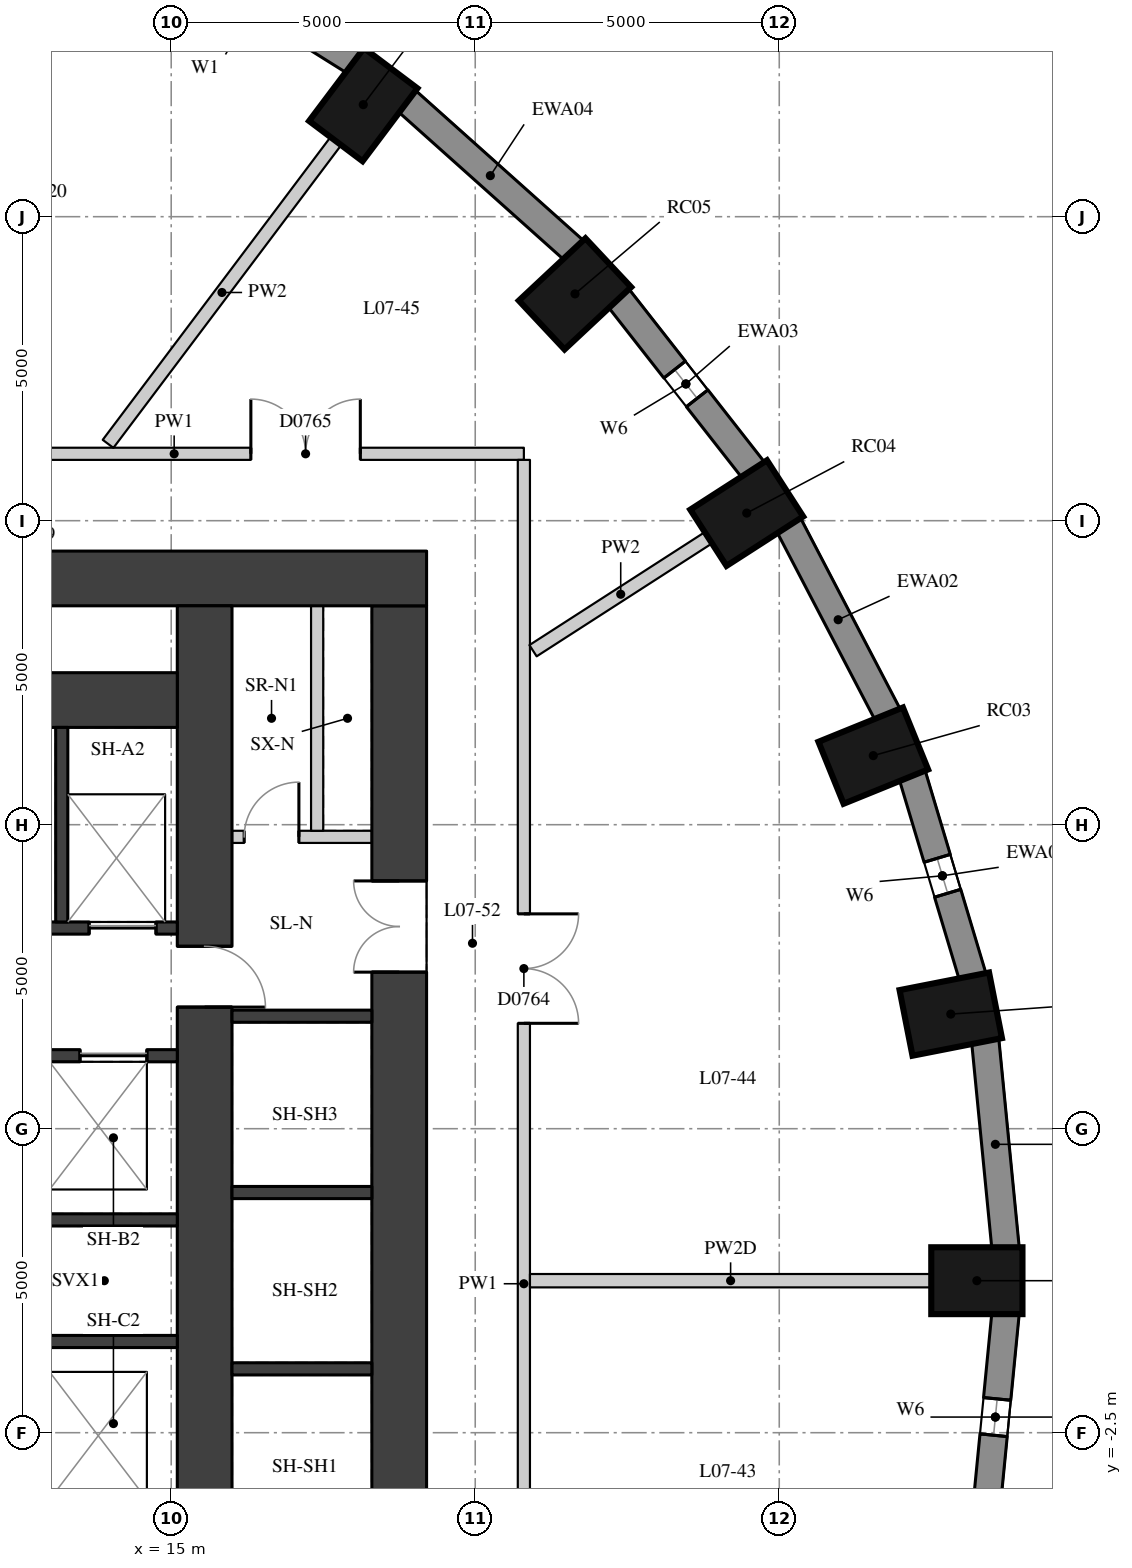
"""IFC4 building model, lengths in metres.
Left out: names, types, materials, properties, quantities, classifications, styles, units other than length and angle.
Written with IfcOpenShell. Run it as: python <this file> out.ifc"""

import sys

from ifc_helpers import new_model, si_unit, direction, frame, frame_2d, origin, origin_2d, place, context, subcontext, project, spatial, rectangle, extrude, element, fill, save


model = new_model("IFC4")
c1 = context("Model", 3, precision=1e-05, world=origin(), true_north=direction((0.0, 1.0)))
c2 = subcontext(c1, "Body", "Model", "MODEL_VIEW")
j1 = project(units=[si_unit("LENGTHUNIT", "METRE"), si_unit("PLANEANGLEUNIT", "RADIAN")], contexts=[c1])
p1 = place(None, origin())
s1 = spatial("IfcSite", under=j1, at=p1, CompositionType="ELEMENT")
p2 = place(p1, origin())
s2 = spatial("IfcBuilding", under=s1, at=p2, CompositionType="ELEMENT")
p3 = place(p2, frame((0.0, 0.0, 31.6)))
s3 = spatial("IfcBuildingStorey", under=s2, at=p3, CompositionType="ELEMENT", Elevation=31.6)
for number, where, z_axis, x_axis in (
    (1, (28.25, 0.0, 0.0), (0.0, 0.0, 1.0), (1.0, 0.0, 0.0)),
    (2, (27.821, 4.385, 0.0), (0.0, 0.0, 1.0), (0.981, 0.193, 0.0)),
    (3, (26.546, 8.636, 0.0), (0.0, 0.0, 1.0), (0.927, 0.376, 0.0)),
    (4, (24.465, 12.625, 0.0), (0.0, 0.0, 1.0), (0.841, 0.541, 0.0)),
    (5, (21.641, 16.23, 0.0), (0.0, 0.0, 1.0), (0.73, 0.683, 0.0)),
    (6, (18.159, 19.343, 0.0), (0.0, 0.0, 1.0), (0.601, 0.799, 0.0)),
):
    element("IfcColumn", number, at=place(p3, frame(where, z_axis=z_axis, x_axis=x_axis)), inside=s3, PredefinedType="COLUMN", context=c2, shape_type="SweptSolid", body=[
        extrude(rectangle(XDim=1.5, YDim=1.1, at=origin_2d()), origin(), (0.0, 0.0, 1.0), 3.3),
    ])
p4 = place(p3, frame((28.722, 0.53, 0.0), z_axis=(0.0, 0.0, 1.0), x_axis=(-0.097389581596, 0.995246336038, 0.0)))
e7 = element("IfcWall", 7, at=p4, inside=s3, PredefinedType="SOLIDWALL", context=c2, shape_type="SweptSolid", body=[
    extrude(rectangle(XDim=3.442, YDim=0.45, at=frame_2d((1.721, 0.0))), origin(), (0.0, 0.0, 1.0), 3.02),
])
p5 = place(p3, frame((28.182, 4.996, 0.0), z_axis=(0.0, 0.0, 1.0), x_axis=(-0.287064133733, 0.957911364963, 0.0)))
e8 = element("IfcWall", 8, at=p5, inside=s3, PredefinedType="SOLIDWALL", context=c2, shape_type="SweptSolid", body=[
    extrude(rectangle(XDim=3.473, YDim=0.45, at=frame_2d((1.737, 0.0))), origin(), (0.0, 0.0, 1.0), 3.02),
])
p6 = place(p5, frame((1.437, 0.0, 0.4)))
e9 = element("IfcOpeningElement", 9, at=p6, cuts=e8, PredefinedType="OPENING", context=c2, shape_type="SweptSolid", body=[
    extrude(rectangle(XDim=0.6, YDim=1.75, at=frame_2d((0.3, 0.875))), frame((0.0, 0.235, 0.0), z_axis=(0.0, -1.0, 0.0), x_axis=(1.0, 0.0, 0.0)), (0.0, 0.0, 1.0), 0.47),
])
p7 = place(p3, frame((26.786, 9.305, 0.0), z_axis=(0.0, 0.0, 1.0), x_axis=(-0.462492775226, 0.886623050041, 0.0)))
e10 = element("IfcWall", 10, at=p7, inside=s3, PredefinedType="SOLIDWALL", context=c2, shape_type="SweptSolid", body=[
    extrude(rectangle(XDim=3.532, YDim=0.45, at=frame_2d((1.766, 0.0))), origin(), (0.0, 0.0, 1.0), 3.02),
])
p8 = place(p3, frame((24.578, 13.328, 0.0), z_axis=(0.0, 0.0, 1.0), x_axis=(-0.616661975264, 0.787228053529, 0.0)))
e11 = element("IfcWall", 11, at=p8, inside=s3, PredefinedType="SOLIDWALL", context=c2, shape_type="SweptSolid", body=[
    extrude(rectangle(XDim=3.61, YDim=0.45, at=frame_2d((1.805, 0.0))), origin(), (0.0, 0.0, 1.0), 3.02),
])
p9 = place(p8, frame((1.505, 0.0, 0.4)))
e12 = element("IfcOpeningElement", 12, at=p9, cuts=e11, PredefinedType="OPENING", context=c2, shape_type="SweptSolid", body=[
    extrude(rectangle(XDim=0.6, YDim=1.75, at=frame_2d((0.3, 0.875))), frame((0.0, 0.235, 0.0), z_axis=(0.0, -1.0, 0.0), x_axis=(1.0, 0.0, 0.0)), (0.0, 0.0, 1.0), 0.47),
])
p10 = place(p3, frame((21.627, 16.943, 0.0), z_axis=(0.0, 0.0, 1.0), x_axis=(-0.745526233716, 0.66647628228, 0.0)))
e13 = element("IfcWall", 13, at=p10, inside=s3, PredefinedType="SOLIDWALL", context=c2, shape_type="SweptSolid", body=[
    extrude(rectangle(XDim=3.697, YDim=0.45, at=frame_2d((1.848, 0.0))), origin(), (0.0, 0.0, 1.0), 3.02),
])
p11 = place(p3, frame((18.023, 20.044, 0.0), z_axis=(0.0, 0.0, 1.0), x_axis=(-0.847635480093, 0.530579016629, 0.0)))
e14 = element("IfcWall", 14, at=p11, inside=s3, PredefinedType="SOLIDWALL", context=c2, shape_type="SweptSolid", body=[
    extrude(rectangle(XDim=3.782, YDim=0.45, at=frame_2d((1.891, 0.0))), origin(), (0.0, 0.0, 1.0), 3.02),
])
p12 = place(p11, frame((0.791, 0.0, 0.4)))
e15 = element("IfcOpeningElement", 15, at=p12, cuts=e14, PredefinedType="OPENING", context=c2, shape_type="SweptSolid", body=[
    extrude(rectangle(XDim=2.2, YDim=1.75, at=frame_2d((1.1, 0.875))), frame((0.0, 0.235, 0.0), z_axis=(0.0, -1.0, 0.0), x_axis=(1.0, 0.0, 0.0)), (0.0, 0.0, 1.0), 0.47),
])
p13 = place(p3, frame((28.387, -3.956, 0.0), z_axis=(0.0, 0.0, 1.0), x_axis=(0.097389581596, 0.995246336038, 0.0)))
e16 = element("IfcWall", 16, at=p13, inside=s3, PredefinedType="SOLIDWALL", context=c2, shape_type="SweptSolid", body=[
    extrude(rectangle(XDim=3.442, YDim=0.45, at=frame_2d((1.721, 0.0))), origin(), (0.0, 0.0, 1.0), 3.02),
])
p14 = place(p13, frame((1.421, 0.0, 0.4)))
e17 = element("IfcOpeningElement", 17, at=p14, cuts=e16, PredefinedType="OPENING", context=c2, shape_type="SweptSolid", body=[
    extrude(rectangle(XDim=0.6, YDim=1.75, at=frame_2d((0.3, 0.875))), frame((0.0, 0.235, 0.0), z_axis=(0.0, -1.0, 0.0), x_axis=(1.0, 0.0, 0.0)), (0.0, 0.0, 1.0), 0.47),
])
p15 = place(p3, frame((18.75, -11.1, 0.0), z_axis=(0.0, 0.0, 1.0), x_axis=(0.0, 1.0, 0.0)))
e18 = element("IfcWall", 18, at=p15, inside=s3, PredefinedType="SHEAR", context=c2, shape_type="SweptSolid", body=[
    extrude(rectangle(XDim=22.2, YDim=0.9, at=frame_2d((11.1, 0.0))), origin(), (0.0, 0.0, 1.0), 3.02),
])
p16 = place(p15, frame((16.175, 0.0, 0.0)))
e19 = element("IfcOpeningElement", 19, at=p16, cuts=e18, PredefinedType="OPENING", context=c2, shape_type="SweptSolid", body=[
    extrude(rectangle(XDim=1.5, YDim=2.1, at=frame_2d((0.75, 1.05))), frame((0.0, 0.46, 0.0), z_axis=(0.0, -1.0, 0.0), x_axis=(1.0, 0.0, 0.0)), (0.0, 0.0, 1.0), 0.92),
])
p17 = place(p15, frame((5.025, 0.0, 0.0)))
e20 = element("IfcOpeningElement", 20, at=p17, cuts=e18, PredefinedType="OPENING", context=c2, shape_type="SweptSolid", body=[
    extrude(rectangle(XDim=1.5, YDim=2.1, at=frame_2d((0.75, 1.05))), frame((0.0, 0.46, 0.0), z_axis=(0.0, -1.0, 0.0), x_axis=(1.0, 0.0, 0.0)), (0.0, 0.0, 1.0), 0.92),
])
p18 = place(p3, frame((4.0, 11.55, 0.0), z_axis=(0.0, 0.0, 1.0), x_axis=(1.0, 0.0, 0.0)))
e21 = element("IfcWall", 21, at=p18, inside=s3, PredefinedType="SHEAR", context=c2, shape_type="SweptSolid", body=[
    extrude(rectangle(XDim=15.2, YDim=0.9, at=frame_2d((7.6, 0.0))), origin(), (0.0, 0.0, 1.0), 3.02),
])
p19 = place(p3, frame((15.55, -11.1, 0.0), z_axis=(0.0, 0.0, 1.0), x_axis=(0.0, 1.0, 0.0)))
e22 = element("IfcWall", 22, at=p19, inside=s3, PredefinedType="SHEAR", context=c2, shape_type="SweptSolid", body=[
    extrude(rectangle(XDim=22.2, YDim=0.9, at=frame_2d((11.1, 0.0))), origin(), (0.0, 0.0, 1.0), 3.02),
])
p20 = place(p19, frame((15.6, 0.0, 0.0)))
e23 = element("IfcOpeningElement", 23, at=p20, cuts=e22, PredefinedType="OPENING", context=c2, shape_type="SweptSolid", body=[
    extrude(rectangle(XDim=1.0, YDim=2.1, at=frame_2d((0.5, 1.05))), frame((0.0, 0.46, 0.0), z_axis=(0.0, -1.0, 0.0), x_axis=(1.0, 0.0, 0.0)), (0.0, 0.0, 1.0), 0.92),
])
p21 = place(p19, frame((5.6, 0.0, 0.0)))
e24 = element("IfcOpeningElement", 24, at=p21, cuts=e22, PredefinedType="OPENING", context=c2, shape_type="SweptSolid", body=[
    extrude(rectangle(XDim=1.0, YDim=2.1, at=frame_2d((0.5, 1.05))), frame((0.0, 0.46, 0.0), z_axis=(0.0, -1.0, 0.0), x_axis=(1.0, 0.0, 0.0)), (0.0, 0.0, 1.0), 0.92),
])
p22 = place(p3, frame((4.9, 9.55, 0.0), z_axis=(0.0, 0.0, 1.0), x_axis=(1.0, 0.0, 0.0)))
e25 = element("IfcWall", 25, at=p22, inside=s3, PredefinedType="SHEAR", context=c2, shape_type="SweptSolid", body=[
    extrude(rectangle(XDim=10.2, YDim=0.9, at=frame_2d((5.1, 0.0))), origin(), (0.0, 0.0, 1.0), 3.02),
])
p23 = place(p3, frame((4.9, 5.8, 0.0), z_axis=(0.0, 0.0, 1.0), x_axis=(1.0, 0.0, 0.0)))
e26 = element("IfcWall", 26, at=p23, inside=s3, PredefinedType="SHEAR", context=c2, shape_type="SweptSolid", body=[
    extrude(rectangle(XDim=10.2, YDim=0.2, at=frame_2d((5.1, 0.0))), origin(), (0.0, 0.0, 1.0), 3.02),
])
p24 = place(p23, frame((6.75, 0.0, 0.0)))
e27 = element("IfcOpeningElement", 27, at=p24, cuts=e26, PredefinedType="OPENING", context=c2, shape_type="SweptSolid", body=[
    extrude(rectangle(XDim=1.1, YDim=2.1, at=frame_2d((0.55, 1.05))), frame((0.0, 0.11, 0.0), z_axis=(0.0, -1.0, 0.0), x_axis=(1.0, 0.0, 0.0)), (0.0, 0.0, 1.0), 0.22),
])
p25 = place(p23, frame((8.75, 0.0, 0.0)))
e28 = element("IfcOpeningElement", 28, at=p25, cuts=e26, PredefinedType="OPENING", context=c2, shape_type="SweptSolid", body=[
    extrude(rectangle(XDim=1.1, YDim=2.1, at=frame_2d((0.55, 1.05))), frame((0.0, 0.11, 0.0), z_axis=(0.0, -1.0, 0.0), x_axis=(1.0, 0.0, 0.0)), (0.0, 0.0, 1.0), 0.22),
])
p26 = place(p3, frame((4.9, 3.7, 0.0), z_axis=(0.0, 0.0, 1.0), x_axis=(1.0, 0.0, 0.0)))
e29 = element("IfcWall", 29, at=p26, inside=s3, PredefinedType="SHEAR", context=c2, shape_type="SweptSolid", body=[
    extrude(rectangle(XDim=10.2, YDim=0.2, at=frame_2d((5.1, 0.0))), origin(), (0.0, 0.0, 1.0), 3.02),
])
p27 = place(p26, frame((6.3, 0.0, 0.0)))
e30 = element("IfcOpeningElement", 30, at=p27, cuts=e29, PredefinedType="OPENING", context=c2, shape_type="SweptSolid", body=[
    extrude(rectangle(XDim=1.1, YDim=2.1, at=frame_2d((0.55, 1.05))), frame((0.0, 0.11, 0.0), z_axis=(0.0, -1.0, 0.0), x_axis=(1.0, 0.0, 0.0)), (0.0, 0.0, 1.0), 0.22),
])
p28 = place(p26, frame((8.6, 0.0, 0.0)))
e31 = element("IfcOpeningElement", 31, at=p28, cuts=e29, PredefinedType="OPENING", context=c2, shape_type="SweptSolid", body=[
    extrude(rectangle(XDim=1.1, YDim=2.1, at=frame_2d((0.55, 1.05))), frame((0.0, 0.11, 0.0), z_axis=(0.0, -1.0, 0.0), x_axis=(1.0, 0.0, 0.0)), (0.0, 0.0, 1.0), 0.22),
])
for number, where, z_axis, x_axis in (
    (32, (4.9, 1.0, 0.0), (0.0, 0.0, 1.0), (1.0, 0.0, 0.0)),
    (33, (4.9, -1.0, 0.0), (0.0, 0.0, 1.0), (1.0, 0.0, 0.0)),
):
    element("IfcWall", number, at=place(p3, frame(where, z_axis=z_axis, x_axis=x_axis)), inside=s3, PredefinedType="SHEAR", context=c2, shape_type="SweptSolid", body=[
        extrude(rectangle(XDim=10.2, YDim=0.2, at=frame_2d((5.1, 0.0))), origin(), (0.0, 0.0, 1.0), 3.02),
    ])
p29 = place(p3, frame((13.2, 5.9, 0.0), z_axis=(0.0, 0.0, 1.0), x_axis=(0.0, 1.0, 0.0)))
e34 = element("IfcWall", 34, at=p29, inside=s3, PredefinedType="SHEAR", context=c2, shape_type="SweptSolid", body=[
    extrude(rectangle(XDim=3.2, YDim=0.2, at=frame_2d((1.6, 0.0))), origin(), (0.0, 0.0, 1.0), 3.02),
])
for number, where, z_axis, x_axis in (
    (35, (16.0, -1.45, 0.0), (0.0, 0.0, 1.0), (1.0, 0.0, 0.0)),
    (36, (16.0, 1.45, 0.0), (0.0, 0.0, 1.0), (1.0, 0.0, 0.0)),
    (37, (16.0, 4.35, 0.0), (0.0, 0.0, 1.0), (1.0, 0.0, 0.0)),
):
    element("IfcWall", number, at=place(p3, frame(where, z_axis=z_axis, x_axis=x_axis)), inside=s3, PredefinedType="SHEAR", context=c2, shape_type="SweptSolid", body=[
        extrude(rectangle(XDim=2.3, YDim=0.2, at=frame_2d((1.15, 0.0))), origin(), (0.0, 0.0, 1.0), 3.02),
    ])
p30 = place(p3, frame((16.0, 7.3, 0.0), z_axis=(0.0, 0.0, 1.0), x_axis=(1.0, 0.0, 0.0)))
e38 = element("IfcWall", 38, at=p30, inside=s3, PredefinedType="PARTITIONING", context=c2, shape_type="SweptSolid", body=[
    extrude(rectangle(XDim=2.3, YDim=0.2, at=frame_2d((1.15, 0.0))), origin(), (0.0, 0.0, 1.0), 3.02),
])
p31 = place(p30, frame((0.2, 0.0, 0.0)))
e39 = element("IfcOpeningElement", 39, at=p31, cuts=e38, PredefinedType="OPENING", context=c2, shape_type="SweptSolid", body=[
    extrude(rectangle(XDim=0.9, YDim=2.1, at=frame_2d((0.45, 1.05))), frame((0.0, 0.11, 0.0), z_axis=(0.0, -1.0, 0.0), x_axis=(1.0, 0.0, 0.0)), (0.0, 0.0, 1.0), 0.22),
])
p32 = place(p3, frame((17.4, 7.4, 0.0), z_axis=(0.0, 0.0, 1.0), x_axis=(0.0, 1.0, 0.0)))
e40 = element("IfcWall", 40, at=p32, inside=s3, PredefinedType="PARTITIONING", context=c2, shape_type="SweptSolid", body=[
    extrude(rectangle(XDim=3.7, YDim=0.2, at=frame_2d((1.85, 0.0))), origin(), (0.0, 0.0, 1.0), 3.02),
])
p33 = place(p3, frame((9.297, 13.6, 0.0), z_axis=(0.0, 0.0, 1.0), x_axis=(1.0, 0.0, 0.0)))
e41 = element("IfcWall", 41, at=p33, inside=s3, PredefinedType="PARTITIONING", context=c2, shape_type="SweptSolid", body=[
    extrude(rectangle(XDim=11.503, YDim=0.2, at=frame_2d((5.751, 0.0))), origin(), (0.0, 0.0, 1.0), 3.02),
])
p34 = place(p33, frame((0.22, 0.0, 0.0)))
e42 = element("IfcOpeningElement", 42, at=p34, cuts=e41, PredefinedType="OPENING", context=c2, shape_type="SweptSolid", body=[
    extrude(rectangle(XDim=1.1, YDim=2.1, at=frame_2d((0.55, 1.05))), frame((0.0, 0.11, 0.0), z_axis=(0.0, -1.0, 0.0), x_axis=(1.0, 0.0, 0.0)), (0.0, 0.0, 1.0), 0.22),
])
p35 = place(p33, frame((7.013, 0.0, 0.0)))
e43 = element("IfcOpeningElement", 43, at=p35, cuts=e41, PredefinedType="OPENING", context=c2, shape_type="SweptSolid", body=[
    extrude(rectangle(XDim=1.8, YDim=2.1, at=frame_2d((0.9, 1.05))), frame((0.0, 0.11, 0.0), z_axis=(0.0, -1.0, 0.0), x_axis=(1.0, 0.0, 0.0)), (0.0, 0.0, 1.0), 0.22),
])
p36 = place(p3, frame((20.8, 13.5, 0.0), z_axis=(0.0, 0.0, 1.0), x_axis=(0.0, -1.0, 0.0)))
e44 = element("IfcWall", 44, at=p36, inside=s3, PredefinedType="PARTITIONING", context=c2, shape_type="SweptSolid", body=[
    extrude(rectangle(XDim=27.1, YDim=0.2, at=frame_2d((13.55, 0.0))), origin(), (0.0, 0.0, 1.0), 3.02),
])
p37 = place(p36, frame((17.733, 0.0, 0.0)))
e45 = element("IfcOpeningElement", 45, at=p37, cuts=e44, PredefinedType="OPENING", context=c2, shape_type="SweptSolid", body=[
    extrude(rectangle(XDim=1.8, YDim=2.1, at=frame_2d((0.9, 1.05))), frame((0.0, 0.11, 0.0), z_axis=(0.0, -1.0, 0.0), x_axis=(1.0, 0.0, 0.0)), (0.0, 0.0, 1.0), 0.22),
])
p38 = place(p36, frame((7.467, 0.0, 0.0)))
e46 = element("IfcOpeningElement", 46, at=p38, cuts=e44, PredefinedType="OPENING", context=c2, shape_type="SweptSolid", body=[
    extrude(rectangle(XDim=1.8, YDim=2.1, at=frame_2d((0.9, 1.05))), frame((0.0, 0.11, 0.0), z_axis=(0.0, -1.0, 0.0), x_axis=(1.0, 0.0, 0.0)), (0.0, 0.0, 1.0), 0.22),
])
p39 = place(p3, frame((27.5, 0.0, 0.0), z_axis=(0.0, 0.0, 1.0), x_axis=(-1.0, 0.0, 0.0)))
e47 = element("IfcWall", 47, at=p39, inside=s3, PredefinedType="PARTITIONING", context=c2, shape_type="SweptSolid", body=[
    extrude(rectangle(XDim=6.6, YDim=0.22, at=frame_2d((3.3, 0.0))), origin(), (0.0, 0.0, 1.0), 2.47),
])
p40 = place(p3, frame((23.835, 12.219, 0.0), z_axis=(0.0, 0.0, 1.0), x_axis=(-0.840694872373, -0.541509124176, 0.0)))
e48 = element("IfcWall", 48, at=p40, inside=s3, PredefinedType="PARTITIONING", context=c2, shape_type="SweptSolid", body=[
    extrude(rectangle(XDim=3.43, YDim=0.22, at=frame_2d((1.715, 0.0))), origin(), (0.0, 0.0, 1.0), 3.02),
])
p41 = place(p3, frame((17.708, 18.743, 0.0), z_axis=(0.0, 0.0, 1.0), x_axis=(-0.601177883261, -0.799115231164, 0.0)))
e49 = element("IfcWall", 49, at=p41, inside=s3, PredefinedType="PARTITIONING", context=c2, shape_type="SweptSolid", body=[
    extrude(rectangle(XDim=6.231, YDim=0.22, at=frame_2d((3.116, 0.0))), origin(), (0.0, 0.0, 1.0), 3.02),
])
p42 = place(p6, origin())
e50 = element("IfcWindow", 50, at=p42, inside=s3, PartitioningType="SINGLE_PANEL", PredefinedType="WINDOW", context=c2, shape_type="SweptSolid", body=[
    extrude(rectangle(XDim=0.6, YDim=1.75, at=frame_2d((0.3, 0.875))), frame((0.0, 0.035, 0.0), z_axis=(0.0, -1.0, 0.0), x_axis=(1.0, 0.0, 0.0)), (0.0, 0.0, 1.0), 0.06),
])
fill(e9, e50)
p43 = place(p9, origin())
e51 = element("IfcWindow", 51, at=p43, inside=s3, PartitioningType="SINGLE_PANEL", PredefinedType="WINDOW", context=c2, shape_type="SweptSolid", body=[
    extrude(rectangle(XDim=0.6, YDim=1.75, at=frame_2d((0.3, 0.875))), frame((0.0, 0.035, 0.0), z_axis=(0.0, -1.0, 0.0), x_axis=(1.0, 0.0, 0.0)), (0.0, 0.0, 1.0), 0.06),
])
fill(e12, e51)
p44 = place(p14, origin())
e52 = element("IfcWindow", 52, at=p44, inside=s3, PartitioningType="SINGLE_PANEL", PredefinedType="WINDOW", context=c2, shape_type="SweptSolid", body=[
    extrude(rectangle(XDim=0.6, YDim=1.75, at=frame_2d((0.3, 0.875))), frame((0.0, 0.035, 0.0), z_axis=(0.0, -1.0, 0.0), x_axis=(1.0, 0.0, 0.0)), (0.0, 0.0, 1.0), 0.06),
])
fill(e17, e52)
p45 = place(p16, origin())
e53 = element("IfcDoor", 53, at=p45, inside=s3, OperationType="DOUBLE_DOOR_SINGLE_SWING", PredefinedType="DOOR", context=c2, shape_type="SweptSolid", body=[
    extrude(rectangle(XDim=1.5, YDim=2.1, at=frame_2d((0.75, 1.05))), frame((0.0, 0.025, 0.0), z_axis=(0.0, -1.0, 0.0), x_axis=(1.0, 0.0, 0.0)), (0.0, 0.0, 1.0), 0.05),
])
fill(e19, e53)
p46 = place(p25, origin())
e54 = element("IfcDoor", 54, at=p46, inside=s3, OperationType="DOUBLE_DOOR_SLIDING", PredefinedType="DOOR", context=c2, shape_type="SweptSolid", body=[
    extrude(rectangle(XDim=1.1, YDim=2.1, at=frame_2d((0.55, 1.05))), frame((0.0, 0.025, 0.0), z_axis=(0.0, -1.0, 0.0), x_axis=(1.0, 0.0, 0.0)), (0.0, 0.0, 1.0), 0.05),
])
fill(e28, e54)
p47 = place(p28, origin())
e55 = element("IfcDoor", 55, at=p47, inside=s3, OperationType="DOUBLE_DOOR_SLIDING", PredefinedType="DOOR", context=c2, shape_type="SweptSolid", body=[
    extrude(rectangle(XDim=1.1, YDim=2.1, at=frame_2d((0.55, 1.05))), frame((0.0, 0.025, 0.0), z_axis=(0.0, -1.0, 0.0), x_axis=(1.0, 0.0, 0.0)), (0.0, 0.0, 1.0), 0.05),
])
fill(e31, e55)
p48 = place(p20, origin())
e56 = element("IfcDoor", 56, at=p48, inside=s3, OperationType="SINGLE_SWING_RIGHT", PredefinedType="DOOR", context=c2, shape_type="SweptSolid", body=[
    extrude(rectangle(XDim=1.0, YDim=2.1, at=frame_2d((0.5, 1.05))), frame((0.0, 0.025, 0.0), z_axis=(0.0, -1.0, 0.0), x_axis=(1.0, 0.0, 0.0)), (0.0, 0.0, 1.0), 0.05),
])
fill(e23, e56)
p49 = place(p31, origin())
e57 = element("IfcDoor", 57, at=p49, inside=s3, OperationType="SINGLE_SWING_RIGHT", PredefinedType="DOOR", context=c2, shape_type="SweptSolid", body=[
    extrude(rectangle(XDim=0.9, YDim=2.1, at=frame_2d((0.45, 1.05))), frame((0.0, 0.025, 0.0), z_axis=(0.0, -1.0, 0.0), x_axis=(1.0, 0.0, 0.0)), (0.0, 0.0, 1.0), 0.05),
])
fill(e39, e57)
p50 = place(p38, origin())
e58 = element("IfcDoor", 58, at=p50, inside=s3, OperationType="DOUBLE_DOOR_SINGLE_SWING", PredefinedType="DOOR", context=c2, shape_type="SweptSolid", body=[
    extrude(rectangle(XDim=1.8, YDim=2.1, at=frame_2d((0.9, 1.05))), frame((0.0, 0.025, 0.0), z_axis=(0.0, -1.0, 0.0), x_axis=(1.0, 0.0, 0.0)), (0.0, 0.0, 1.0), 0.05),
])
fill(e46, e58)
p51 = place(p35, origin())
e59 = element("IfcDoor", 59, at=p51, inside=s3, OperationType="DOUBLE_DOOR_SINGLE_SWING", PredefinedType="DOOR", context=c2, shape_type="SweptSolid", body=[
    extrude(rectangle(XDim=1.8, YDim=2.1, at=frame_2d((0.9, 1.05))), frame((0.0, 0.025, 0.0), z_axis=(0.0, -1.0, 0.0), x_axis=(1.0, 0.0, 0.0)), (0.0, 0.0, 1.0), 0.05),
])
fill(e43, e59)
save(model, sys.argv[1])
